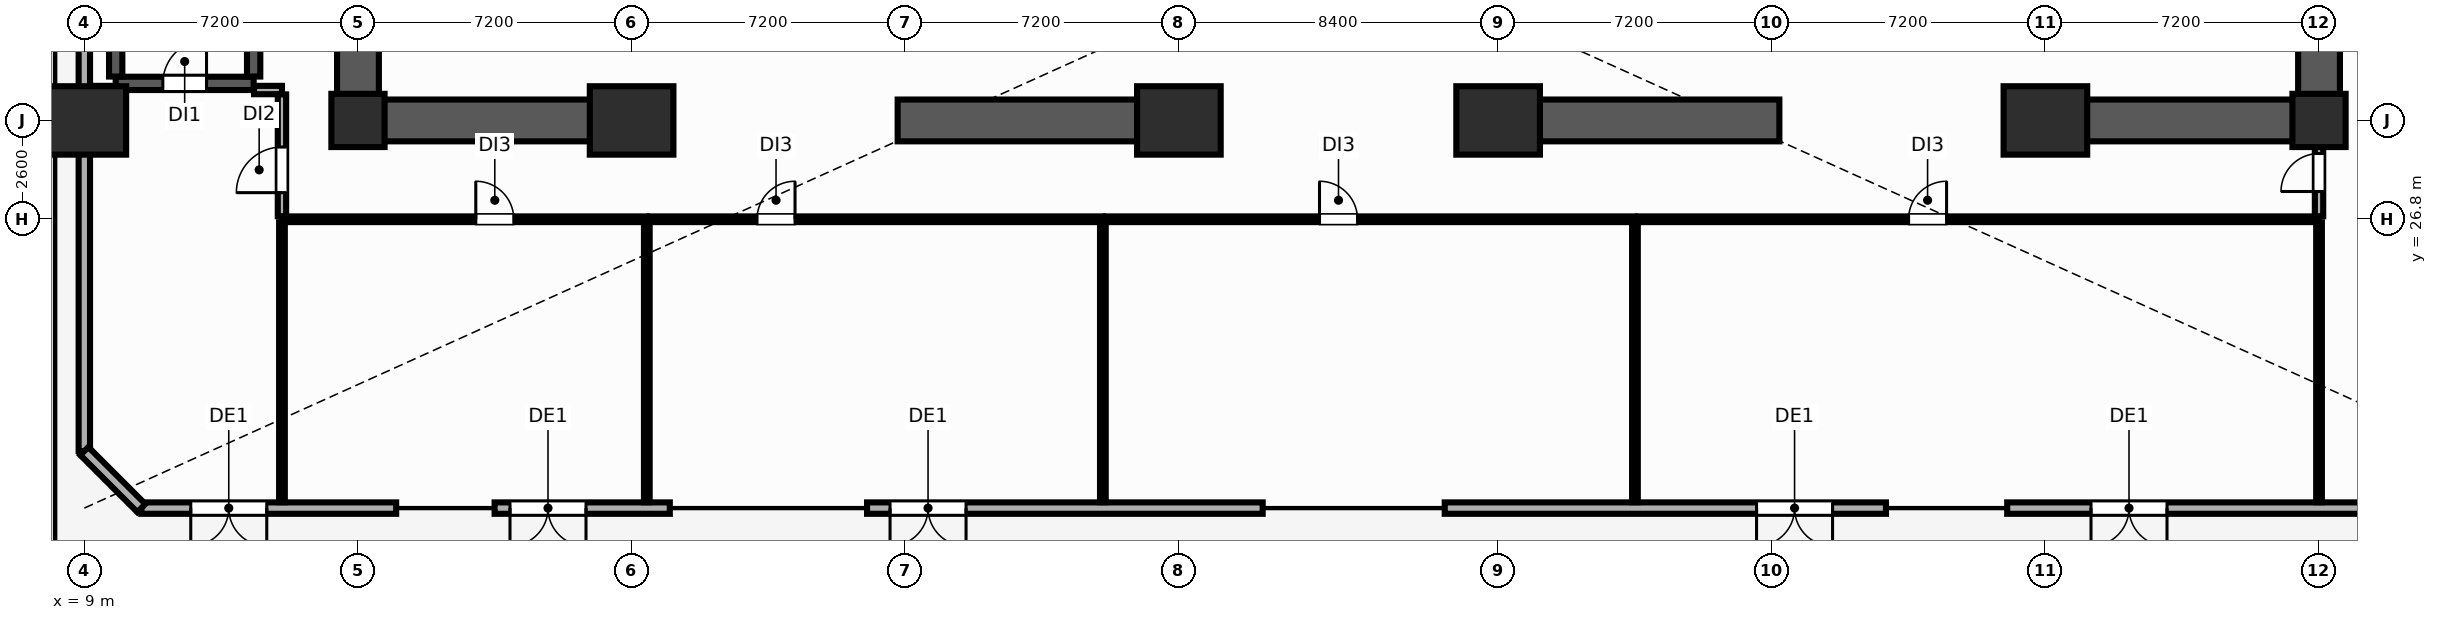
"""IFC4 building model, lengths in metres.
Left out: names, types, materials, properties, quantities, classifications, styles, units other than length and angle.
Written with IfcOpenShell. Run it as: python <this file> out.ifc"""

import sys

from ifc_helpers import new_model, si_unit, direction, frame, frame_2d, origin, origin_2d, place, context, subcontext, project, spatial, rectangle, extrude, element, fill, save


model = new_model("IFC4")
c1 = context("Model", 3, precision=1e-05, world=origin(), true_north=direction((0.0, 1.0)))
c2 = subcontext(c1, "Body", "Model", "MODEL_VIEW")
j1 = project(units=[si_unit("LENGTHUNIT", "METRE"), si_unit("PLANEANGLEUNIT", "RADIAN")], contexts=[c1])
p1 = place(None, origin())
s1 = spatial("IfcSite", under=j1, at=p1, CompositionType="ELEMENT")
p2 = place(p1, origin())
s2 = spatial("IfcBuilding", under=s1, at=p2, CompositionType="ELEMENT")
p3 = place(p2, origin())
s3 = spatial("IfcBuildingStorey", under=s2, at=p3, CompositionType="ELEMENT", Elevation=0.0)
for number, where, z_axis, x_axis in (
    (1, (9.0, 29.4, 0.0), (0.0, 0.0, 1.0), (1.0, 0.0, 0.0)),
    (2, (23.4, 29.4, 0.0), (0.0, 0.0, 1.0), (1.0, 0.0, 0.0)),
    (3, (37.8, 29.4, 0.0), (0.0, 0.0, 1.0), (1.0, 0.0, 0.0)),
    (4, (46.2, 29.4, 0.0), (0.0, 0.0, 1.0), (1.0, 0.0, 0.0)),
    (5, (60.6, 29.4, 0.0), (0.0, 0.0, 1.0), (1.0, 0.0, 0.0)),
):
    element("IfcColumn", number, at=place(p3, frame(where, z_axis=z_axis, x_axis=x_axis)), inside=s3, PredefinedType="USERDEFINED", context=c2, shape_type="SweptSolid", body=[
        extrude(rectangle(XDim=2.2, YDim=1.8, at=origin_2d()), origin(), (0.0, 0.0, 1.0), 7.68),
    ])
for number, where, z_axis, x_axis in (
    (6, (16.2, 29.4, 0.0), (0.0, 0.0, 1.0), (1.0, 0.0, 0.0)),
    (7, (67.8, 29.4, 0.0), (0.0, 0.0, 1.0), (1.0, 0.0, 0.0)),
):
    element("IfcColumn", number, at=place(p3, frame(where, z_axis=z_axis, x_axis=x_axis)), inside=s3, PredefinedType="COLUMN", context=c2, shape_type="SweptSolid", body=[
        extrude(rectangle(XDim=1.4, YDim=1.4, at=origin_2d()), origin(), (0.0, 0.0, 1.0), 7.68),
    ])
p4 = place(p3, frame((73.5, 19.2, 0.0), z_axis=(0.0, 0.0, 1.0), x_axis=(-1.0, 0.0, 0.0)))
e8 = element("IfcWall", 8, at=p4, inside=s3, PredefinedType="SOLIDWALL", context=c2, shape_type="SweptSolid", body=[
    extrude(rectangle(XDim=13.905, YDim=0.3, at=frame_2d((6.953, 0.0))), origin(), (0.0, 0.0, 1.0), 7.68),
])
p5 = place(p4, frame((9.7, 0.0, 0.0)))
e9 = element("IfcOpeningElement", 9, at=p5, cuts=e8, PredefinedType="OPENING", context=c2, shape_type="SweptSolid", body=[
    extrude(rectangle(XDim=2.0, YDim=2.4, at=frame_2d((1.0, 1.2))), frame((0.0, 0.16, 0.0), z_axis=(0.0, -1.0, 0.0), x_axis=(1.0, 0.0, 0.0)), (0.0, 0.0, 1.0), 0.32),
])
p6 = place(p4, frame((1.3, 0.0, 0.0)))
e10 = element("IfcOpeningElement", 10, at=p6, cuts=e8, PredefinedType="OPENING", context=c2, shape_type="SweptSolid", body=[
    extrude(rectangle(XDim=2.0, YDim=2.4, at=frame_2d((1.0, 1.2))), frame((0.0, 0.16, 0.0), z_axis=(0.0, -1.0, 0.0), x_axis=(1.0, 0.0, 0.0)), (0.0, 0.0, 1.0), 0.32),
])
p7 = place(p3, frame((56.405, 19.2, 0.0), z_axis=(0.0, 0.0, 1.0), x_axis=(-1.0, 0.0, 0.0)))
e11 = element("IfcWall", 11, at=p7, inside=s3, PredefinedType="SOLIDWALL", context=c2, shape_type="SweptSolid", body=[
    extrude(rectangle(XDim=11.61, YDim=0.3, at=frame_2d((5.805, 0.0))), origin(), (0.0, 0.0, 1.0), 7.68),
])
p8 = place(p7, frame((1.405, 0.0, 0.0)))
e12 = element("IfcOpeningElement", 12, at=p8, cuts=e11, PredefinedType="OPENING", context=c2, shape_type="SweptSolid", body=[
    extrude(rectangle(XDim=2.0, YDim=2.4, at=frame_2d((1.0, 1.2))), frame((0.0, 0.16, 0.0), z_axis=(0.0, -1.0, 0.0), x_axis=(1.0, 0.0, 0.0)), (0.0, 0.0, 1.0), 0.32),
])
p9 = place(p3, frame((40.005, 19.2, 0.0), z_axis=(0.0, 0.0, 1.0), x_axis=(-1.0, 0.0, 0.0)))
e13 = element("IfcWall", 13, at=p9, inside=s3, PredefinedType="SOLIDWALL", context=c2, shape_type="SweptSolid", body=[
    extrude(rectangle(XDim=10.41, YDim=0.3, at=frame_2d((5.205, 0.0))), origin(), (0.0, 0.0, 1.0), 7.68),
])
p10 = place(p9, frame((7.805, 0.0, 0.0)))
e14 = element("IfcOpeningElement", 14, at=p10, cuts=e13, PredefinedType="OPENING", context=c2, shape_type="SweptSolid", body=[
    extrude(rectangle(XDim=2.0, YDim=2.4, at=frame_2d((1.0, 1.2))), frame((0.0, 0.16, 0.0), z_axis=(0.0, -1.0, 0.0), x_axis=(1.0, 0.0, 0.0)), (0.0, 0.0, 1.0), 0.32),
])
p11 = place(p3, frame((24.405, 19.2, 0.0), z_axis=(0.0, 0.0, 1.0), x_axis=(-1.0, 0.0, 0.0)))
e15 = element("IfcWall", 15, at=p11, inside=s3, PredefinedType="SOLIDWALL", context=c2, shape_type="SweptSolid", body=[
    extrude(rectangle(XDim=4.61, YDim=0.3, at=frame_2d((2.305, 0.0))), origin(), (0.0, 0.0, 1.0), 7.68),
])
p12 = place(p11, frame((2.205, 0.0, 0.0)))
e16 = element("IfcOpeningElement", 16, at=p12, cuts=e15, PredefinedType="OPENING", context=c2, shape_type="SweptSolid", body=[
    extrude(rectangle(XDim=2.0, YDim=2.4, at=frame_2d((1.0, 1.2))), frame((0.0, 0.16, 0.0), z_axis=(0.0, -1.0, 0.0), x_axis=(1.0, 0.0, 0.0)), (0.0, 0.0, 1.0), 0.32),
])
p13 = place(p3, frame((17.205, 19.2, 0.0), z_axis=(0.0, 0.0, 1.0), x_axis=(-1.0, 0.0, 0.0)))
e17 = element("IfcWall", 17, at=p13, inside=s3, PredefinedType="SOLIDWALL", context=c2, shape_type="SweptSolid", body=[
    extrude(rectangle(XDim=6.705, YDim=0.3, at=frame_2d((3.353, 0.0))), origin(), (0.0, 0.0, 1.0), 7.68),
])
p14 = place(p13, frame((3.405, 0.0, 0.0)))
e18 = element("IfcOpeningElement", 18, at=p14, cuts=e17, PredefinedType="OPENING", context=c2, shape_type="SweptSolid", body=[
    extrude(rectangle(XDim=2.0, YDim=2.4, at=frame_2d((1.0, 1.2))), frame((0.0, 0.16, 0.0), z_axis=(0.0, -1.0, 0.0), x_axis=(1.0, 0.0, 0.0)), (0.0, 0.0, 1.0), 0.32),
])
p15 = place(p3, frame((9.0, 47.5, 0.0), z_axis=(0.0, 0.0, 1.0), x_axis=(0.0, -1.0, 0.0)))
e19 = element("IfcWall", 19, at=p15, inside=s3, PredefinedType="SOLIDWALL", context=c2, shape_type="SweptSolid", body=[
    extrude(rectangle(XDim=26.8, YDim=0.3, at=frame_2d((13.4, 0.0))), origin(), (0.0, 0.0, 1.0), 5.4),
])
p16 = place(p3, frame((9.0, 20.7, 0.0), z_axis=(0.0, 0.0, 1.0), x_axis=(0.707106781187, -0.707106781187, 0.0)))
e20 = element("IfcWall", 20, at=p16, inside=s3, PredefinedType="SOLIDWALL", context=c2, shape_type="SweptSolid", body=[
    extrude(rectangle(XDim=2.121, YDim=0.3, at=frame_2d((1.061, 0.0))), origin(), (0.0, 0.0, 1.0), 7.68),
])
for number, where, z_axis, x_axis in (
    (21, (16.2, 29.4, 0.0), (0.0, 0.0, 1.0), (0.0, 1.0, 0.0)),
    (22, (67.8, 29.4, 0.0), (0.0, 0.0, 1.0), (0.0, 1.0, 0.0)),
):
    element("IfcWall", number, at=place(p3, frame(where, z_axis=z_axis, x_axis=x_axis)), inside=s3, PredefinedType="SHEAR", context=c2, shape_type="SweptSolid", body=[
        extrude(rectangle(XDim=19.2, YDim=1.1, at=frame_2d((9.6, 0.0))), origin(), (0.0, 0.0, 1.0), 7.68),
    ])
p17 = place(p3, frame((16.755, 29.4, 0.0), z_axis=(0.0, 0.0, 1.0), x_axis=(1.0, 0.0, 0.0)))
e23 = element("IfcWall", 23, at=p17, inside=s3, PredefinedType="SHEAR", context=c2, shape_type="SweptSolid", body=[
    extrude(rectangle(XDim=6.845, YDim=1.1, at=frame_2d((3.423, 0.0))), origin(), (0.0, 0.0, 1.0), 7.68),
])
for number, where, z_axis, x_axis in (
    (24, (30.4, 29.4, 0.0), (0.0, 0.0, 1.0), (1.0, 0.0, 0.0)),
    (25, (46.0, 29.4, 0.0), (0.0, 0.0, 1.0), (1.0, 0.0, 0.0)),
):
    element("IfcWall", number, at=place(p3, frame(where, z_axis=z_axis, x_axis=x_axis)), inside=s3, PredefinedType="SHEAR", context=c2, shape_type="SweptSolid", body=[
        extrude(rectangle(XDim=7.6, YDim=1.1, at=frame_2d((3.8, 0.0))), origin(), (0.0, 0.0, 1.0), 7.68),
    ])
p18 = place(p3, frame((60.4, 29.4, 0.0), z_axis=(0.0, 0.0, 1.0), x_axis=(1.0, 0.0, 0.0)))
e26 = element("IfcWall", 26, at=p18, inside=s3, PredefinedType="SHEAR", context=c2, shape_type="SweptSolid", body=[
    extrude(rectangle(XDim=6.845, YDim=1.1, at=frame_2d((3.423, 0.0))), origin(), (0.0, 0.0, 1.0), 7.68),
])
p19 = place(p3, frame((9.825, 30.375, 0.0), z_axis=(0.0, 0.0, 1.0), x_axis=(1.0, 0.0, 0.0)))
e27 = element("IfcWall", 27, at=p19, inside=s3, PredefinedType="SHEAR", context=c2, shape_type="SweptSolid", body=[
    extrude(rectangle(XDim=3.63, YDim=0.35, at=frame_2d((1.815, 0.0))), origin(), (0.0, 0.0, 1.0), 7.68),
])
p20 = place(p19, frame((1.24, 0.0, 0.0)))
e28 = element("IfcOpeningElement", 28, at=p20, cuts=e27, PredefinedType="OPENING", context=c2, shape_type="SweptSolid", body=[
    extrude(rectangle(XDim=1.15, YDim=2.15, at=frame_2d((0.575, 1.075))), frame((0.0, 0.185, 0.0), z_axis=(0.0, -1.0, 0.0), x_axis=(1.0, 0.0, 0.0)), (0.0, 0.0, 1.0), 0.37),
])
for number, where, z_axis, x_axis in (
    (29, (9.825, 30.555, 0.0), (0.0, 0.0, 1.0), (0.0, 1.0, 0.0)),
    (30, (13.455, 30.555, 0.0), (0.0, 0.0, 1.0), (0.0, 1.0, 0.0)),
):
    element("IfcWall", number, at=place(p3, frame(where, z_axis=z_axis, x_axis=x_axis)), inside=s3, PredefinedType="SHEAR", context=c2, shape_type="SweptSolid", body=[
        extrude(rectangle(XDim=8.44, YDim=0.35, at=frame_2d((4.22, 0.0))), origin(), (0.0, 0.0, 1.0), 7.68),
    ])
p21 = place(p3, frame((14.2, 26.8, 0.0), z_axis=(0.0, 0.0, 1.0), x_axis=(1.0, 0.0, 0.0)))
e31 = element("IfcWall", 31, at=p21, inside=s3, PredefinedType="PARTITIONING", context=c2, shape_type="SweptSolid", body=[
    extrude(rectangle(XDim=9.6, YDim=0.15, at=frame_2d((4.8, 0.0))), origin(), (0.0, 0.0, 1.0), 7.68),
])
p22 = place(p21, frame((5.1, 0.0, 0.0)))
e32 = element("IfcOpeningElement", 32, at=p22, cuts=e31, PredefinedType="OPENING", context=c2, shape_type="SweptSolid", body=[
    extrude(rectangle(XDim=1.0, YDim=2.15, at=frame_2d((0.5, 1.075))), frame((0.0, 0.085, 0.0), z_axis=(0.0, -1.0, 0.0), x_axis=(1.0, 0.0, 0.0)), (0.0, 0.0, 1.0), 0.17),
])
p23 = place(p3, frame((14.2, 19.355, 0.0), z_axis=(0.0, 0.0, 1.0), x_axis=(0.0, 1.0, 0.0)))
e33 = element("IfcWall", 33, at=p23, inside=s3, PredefinedType="PARTITIONING", context=c2, shape_type="SweptSolid", body=[
    extrude(rectangle(XDim=7.365, YDim=0.15, at=frame_2d((3.683, 0.0))), origin(), (0.0, 0.0, 1.0), 7.68),
])
p24 = place(p3, frame((23.8, 19.355, 0.0), z_axis=(0.0, 0.0, 1.0), x_axis=(0.0, 1.0, 0.0)))
e34 = element("IfcWall", 34, at=p24, inside=s3, PredefinedType="PARTITIONING", context=c2, shape_type="SweptSolid", body=[
    extrude(rectangle(XDim=7.365, YDim=0.15, at=frame_2d((3.683, 0.0))), origin(), (0.0, 0.0, 1.0), 5.4),
])
p25 = place(p3, frame((23.88, 26.8, 0.0), z_axis=(0.0, 0.0, 1.0), x_axis=(1.0, 0.0, 0.0)))
e35 = element("IfcWall", 35, at=p25, inside=s3, PredefinedType="PARTITIONING", context=c2, shape_type="SweptSolid", body=[
    extrude(rectangle(XDim=11.92, YDim=0.15, at=frame_2d((5.96, 0.0))), origin(), (0.0, 0.0, 1.0), 7.68),
])
p26 = place(p25, frame((2.82, 0.0, 0.0)))
e36 = element("IfcOpeningElement", 36, at=p26, cuts=e35, PredefinedType="OPENING", context=c2, shape_type="SweptSolid", body=[
    extrude(rectangle(XDim=1.0, YDim=2.15, at=frame_2d((0.5, 1.075))), frame((0.0, 0.085, 0.0), z_axis=(0.0, -1.0, 0.0), x_axis=(1.0, 0.0, 0.0)), (0.0, 0.0, 1.0), 0.17),
])
p27 = place(p3, frame((35.8, 19.355, 0.0), z_axis=(0.0, 0.0, 1.0), x_axis=(0.0, 1.0, 0.0)))
e37 = element("IfcWall", 37, at=p27, inside=s3, PredefinedType="PARTITIONING", context=c2, shape_type="SweptSolid", body=[
    extrude(rectangle(XDim=7.365, YDim=0.15, at=frame_2d((3.683, 0.0))), origin(), (0.0, 0.0, 1.0), 7.68),
])
p28 = place(p3, frame((35.88, 26.8, 0.0), z_axis=(0.0, 0.0, 1.0), x_axis=(1.0, 0.0, 0.0)))
e38 = element("IfcWall", 38, at=p28, inside=s3, PredefinedType="PARTITIONING", context=c2, shape_type="SweptSolid", body=[
    extrude(rectangle(XDim=13.92, YDim=0.15, at=frame_2d((6.96, 0.0))), origin(), (0.0, 0.0, 1.0), 7.68),
])
p29 = place(p28, frame((5.62, 0.0, 0.0)))
e39 = element("IfcOpeningElement", 39, at=p29, cuts=e38, PredefinedType="OPENING", context=c2, shape_type="SweptSolid", body=[
    extrude(rectangle(XDim=1.0, YDim=2.15, at=frame_2d((0.5, 1.075))), frame((0.0, 0.085, 0.0), z_axis=(0.0, -1.0, 0.0), x_axis=(1.0, 0.0, 0.0)), (0.0, 0.0, 1.0), 0.17),
])
p30 = place(p3, frame((49.8, 19.355, 0.0), z_axis=(0.0, 0.0, 1.0), x_axis=(0.0, 1.0, 0.0)))
e40 = element("IfcWall", 40, at=p30, inside=s3, PredefinedType="PARTITIONING", context=c2, shape_type="SweptSolid", body=[
    extrude(rectangle(XDim=7.365, YDim=0.15, at=frame_2d((3.683, 0.0))), origin(), (0.0, 0.0, 1.0), 7.68),
])
p31 = place(p3, frame((49.88, 26.8, 0.0), z_axis=(0.0, 0.0, 1.0), x_axis=(1.0, 0.0, 0.0)))
e41 = element("IfcWall", 41, at=p31, inside=s3, PredefinedType="PARTITIONING", context=c2, shape_type="SweptSolid", body=[
    extrude(rectangle(XDim=17.92, YDim=0.15, at=frame_2d((8.96, 0.0))), origin(), (0.0, 0.0, 1.0), 7.68),
])
p32 = place(p31, frame((7.12, 0.0, 0.0)))
e42 = element("IfcOpeningElement", 42, at=p32, cuts=e41, PredefinedType="OPENING", context=c2, shape_type="SweptSolid", body=[
    extrude(rectangle(XDim=1.0, YDim=2.15, at=frame_2d((0.5, 1.075))), frame((0.0, 0.085, 0.0), z_axis=(0.0, -1.0, 0.0), x_axis=(1.0, 0.0, 0.0)), (0.0, 0.0, 1.0), 0.17),
])
p33 = place(p3, frame((67.8, 19.355, 0.0), z_axis=(0.0, 0.0, 1.0), x_axis=(0.0, 1.0, 0.0)))
e43 = element("IfcWall", 43, at=p33, inside=s3, PredefinedType="PARTITIONING", context=c2, shape_type="SweptSolid", body=[
    extrude(rectangle(XDim=7.365, YDim=0.15, at=frame_2d((3.683, 0.0))), origin(), (0.0, 0.0, 1.0), 7.68),
])
p34 = place(p3, frame((9.155, 30.2, 0.0), z_axis=(0.0, 0.0, 1.0), x_axis=(1.0, 0.0, 0.0)))
e44 = element("IfcWall", 44, at=p34, inside=s3, PredefinedType="PARTITIONING", context=c2, shape_type="SweptSolid", body=[
    extrude(rectangle(XDim=0.66, YDim=0.22, at=frame_2d((0.33, 0.0))), origin(), (0.0, 0.0, 1.0), 7.68),
])
p35 = place(p3, frame((13.465, 30.2, 0.0), z_axis=(0.0, 0.0, 1.0), x_axis=(1.0, 0.0, 0.0)))
e45 = element("IfcWall", 45, at=p35, inside=s3, PredefinedType="PARTITIONING", context=c2, shape_type="SweptSolid", body=[
    extrude(rectangle(XDim=0.735, YDim=0.22, at=frame_2d((0.367, 0.0))), origin(), (0.0, 0.0, 1.0), 5.4),
])
p36 = place(p3, frame((14.2, 26.88, 0.0), z_axis=(0.0, 0.0, 1.0), x_axis=(0.0, 1.0, 0.0)))
e46 = element("IfcWall", 46, at=p36, inside=s3, PredefinedType="PARTITIONING", context=c2, shape_type="SweptSolid", body=[
    extrude(rectangle(XDim=3.205, YDim=0.22, at=frame_2d((1.603, 0.0))), origin(), (0.0, 0.0, 1.0), 7.68),
])
p37 = place(p36, frame((0.62, 0.0, 0.0)))
e47 = element("IfcOpeningElement", 47, at=p37, cuts=e46, PredefinedType="OPENING", context=c2, shape_type="SweptSolid", body=[
    extrude(rectangle(XDim=1.2, YDim=2.15, at=frame_2d((0.6, 1.075))), frame((0.0, 0.12, 0.0), z_axis=(0.0, -1.0, 0.0), x_axis=(1.0, 0.0, 0.0)), (0.0, 0.0, 1.0), 0.24),
])
p38 = place(p3, frame((67.8, 26.88, 0.0), z_axis=(0.0, 0.0, 1.0), x_axis=(0.0, 1.0, 0.0)))
e48 = element("IfcWall", 48, at=p38, inside=s3, PredefinedType="PARTITIONING", context=c2, shape_type="SweptSolid", body=[
    extrude(rectangle(XDim=2.51, YDim=0.22, at=frame_2d((1.255, 0.0))), origin(), (0.0, 0.0, 1.0), 7.68),
])
p39 = place(p38, frame((0.65, 0.0, 0.0)))
e49 = element("IfcOpeningElement", 49, at=p39, cuts=e48, PredefinedType="OPENING", context=c2, shape_type="SweptSolid", body=[
    extrude(rectangle(XDim=1.0, YDim=2.15, at=frame_2d((0.5, 1.075))), frame((0.0, 0.12, 0.0), z_axis=(0.0, -1.0, 0.0), x_axis=(1.0, 0.0, 0.0)), (0.0, 0.0, 1.0), 0.24),
])
p40 = place(p14, origin())
e50 = element("IfcDoor", 50, at=p40, inside=s3, OperationType="DOUBLE_DOOR_SINGLE_SWING", PredefinedType="DOOR", context=c2, shape_type="SweptSolid", body=[
    extrude(rectangle(XDim=2.0, YDim=2.4, at=frame_2d((1.0, 1.2))), frame((0.0, 0.025, 0.0), z_axis=(0.0, -1.0, 0.0), x_axis=(1.0, 0.0, 0.0)), (0.0, 0.0, 1.0), 0.05),
])
fill(e18, e50)
p41 = place(p12, origin())
e51 = element("IfcDoor", 51, at=p41, inside=s3, OperationType="DOUBLE_DOOR_SINGLE_SWING", PredefinedType="DOOR", context=c2, shape_type="SweptSolid", body=[
    extrude(rectangle(XDim=2.0, YDim=2.4, at=frame_2d((1.0, 1.2))), frame((0.0, 0.025, 0.0), z_axis=(0.0, -1.0, 0.0), x_axis=(1.0, 0.0, 0.0)), (0.0, 0.0, 1.0), 0.05),
])
fill(e16, e51)
p42 = place(p10, origin())
e52 = element("IfcDoor", 52, at=p42, inside=s3, OperationType="DOUBLE_DOOR_SINGLE_SWING", PredefinedType="DOOR", context=c2, shape_type="SweptSolid", body=[
    extrude(rectangle(XDim=2.0, YDim=2.4, at=frame_2d((1.0, 1.2))), frame((0.0, 0.025, 0.0), z_axis=(0.0, -1.0, 0.0), x_axis=(1.0, 0.0, 0.0)), (0.0, 0.0, 1.0), 0.05),
])
fill(e14, e52)
p43 = place(p8, origin())
e53 = element("IfcDoor", 53, at=p43, inside=s3, OperationType="DOUBLE_DOOR_SINGLE_SWING", PredefinedType="DOOR", context=c2, shape_type="SweptSolid", body=[
    extrude(rectangle(XDim=2.0, YDim=2.4, at=frame_2d((1.0, 1.2))), frame((0.0, 0.025, 0.0), z_axis=(0.0, -1.0, 0.0), x_axis=(1.0, 0.0, 0.0)), (0.0, 0.0, 1.0), 0.05),
])
fill(e12, e53)
p44 = place(p5, origin())
e54 = element("IfcDoor", 54, at=p44, inside=s3, OperationType="DOUBLE_DOOR_SINGLE_SWING", PredefinedType="DOOR", context=c2, shape_type="SweptSolid", body=[
    extrude(rectangle(XDim=2.0, YDim=2.4, at=frame_2d((1.0, 1.2))), frame((0.0, 0.025, 0.0), z_axis=(0.0, -1.0, 0.0), x_axis=(1.0, 0.0, 0.0)), (0.0, 0.0, 1.0), 0.05),
])
fill(e9, e54)
p45 = place(p20, origin())
e55 = element("IfcDoor", 55, at=p45, inside=s3, OperationType="SINGLE_SWING_RIGHT", PredefinedType="DOOR", context=c2, shape_type="SweptSolid", body=[
    extrude(rectangle(XDim=1.15, YDim=2.15, at=frame_2d((0.575, 1.075))), frame((0.0, 0.025, 0.0), z_axis=(0.0, -1.0, 0.0), x_axis=(1.0, 0.0, 0.0)), (0.0, 0.0, 1.0), 0.05),
])
fill(e28, e55)
p46 = place(p22, origin())
e56 = element("IfcDoor", 56, at=p46, inside=s3, OperationType="SINGLE_SWING_LEFT", PredefinedType="DOOR", context=c2, shape_type="SweptSolid", body=[
    extrude(rectangle(XDim=1.0, YDim=2.15, at=frame_2d((0.5, 1.075))), frame((0.0, 0.025, 0.0), z_axis=(0.0, -1.0, 0.0), x_axis=(1.0, 0.0, 0.0)), (0.0, 0.0, 1.0), 0.05),
])
fill(e32, e56)
p47 = place(p26, origin())
e57 = element("IfcDoor", 57, at=p47, inside=s3, OperationType="SINGLE_SWING_RIGHT", PredefinedType="DOOR", context=c2, shape_type="SweptSolid", body=[
    extrude(rectangle(XDim=1.0, YDim=2.15, at=frame_2d((0.5, 1.075))), frame((0.0, 0.025, 0.0), z_axis=(0.0, -1.0, 0.0), x_axis=(1.0, 0.0, 0.0)), (0.0, 0.0, 1.0), 0.05),
])
fill(e36, e57)
p48 = place(p29, origin())
e58 = element("IfcDoor", 58, at=p48, inside=s3, OperationType="SINGLE_SWING_LEFT", PredefinedType="DOOR", context=c2, shape_type="SweptSolid", body=[
    extrude(rectangle(XDim=1.0, YDim=2.15, at=frame_2d((0.5, 1.075))), frame((0.0, 0.025, 0.0), z_axis=(0.0, -1.0, 0.0), x_axis=(1.0, 0.0, 0.0)), (0.0, 0.0, 1.0), 0.05),
])
fill(e39, e58)
p49 = place(p32, origin())
e59 = element("IfcDoor", 59, at=p49, inside=s3, OperationType="SINGLE_SWING_RIGHT", PredefinedType="DOOR", context=c2, shape_type="SweptSolid", body=[
    extrude(rectangle(XDim=1.0, YDim=2.15, at=frame_2d((0.5, 1.075))), frame((0.0, 0.025, 0.0), z_axis=(0.0, -1.0, 0.0), x_axis=(1.0, 0.0, 0.0)), (0.0, 0.0, 1.0), 0.05),
])
fill(e42, e59)
p50 = place(p37, origin())
e60 = element("IfcDoor", 60, at=p50, inside=s3, OperationType="SINGLE_SWING_LEFT", PredefinedType="DOOR", context=c2, shape_type="SweptSolid", body=[
    extrude(rectangle(XDim=1.2, YDim=2.15, at=frame_2d((0.6, 1.075))), frame((0.0, 0.025, 0.0), z_axis=(0.0, -1.0, 0.0), x_axis=(1.0, 0.0, 0.0)), (0.0, 0.0, 1.0), 0.05),
])
fill(e47, e60)
p51 = place(p39, origin())
e61 = element("IfcDoor", 61, at=p51, inside=s3, OperationType="SINGLE_SWING_LEFT", PredefinedType="DOOR", context=c2, shape_type="SweptSolid", body=[
    extrude(rectangle(XDim=1.0, YDim=2.15, at=frame_2d((0.5, 1.075))), frame((0.0, 0.025, 0.0), z_axis=(0.0, -1.0, 0.0), x_axis=(1.0, 0.0, 0.0)), (0.0, 0.0, 1.0), 0.05),
])
fill(e49, e61)
save(model, sys.argv[1])
